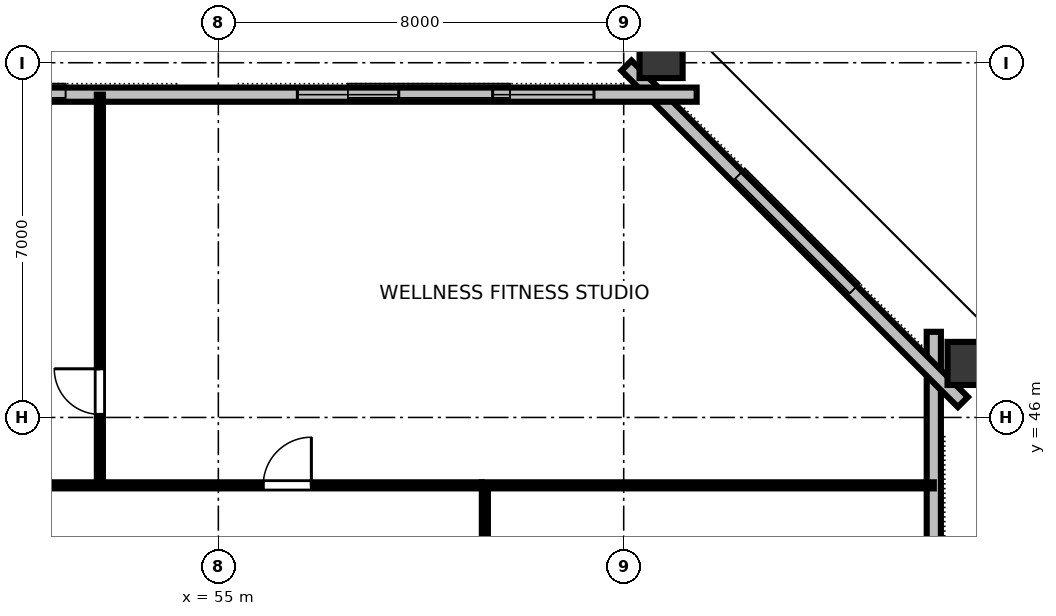
"""IFC4 building model, lengths in metres.
Left out: names, types, materials, properties, quantities, classifications, styles, units other than length and angle.
Written with IfcOpenShell. Run it as: python <this file> out.ifc"""

import sys

from ifc_helpers import new_model, si_unit, direction, frame, frame_2d, origin, origin_2d, place, context, subcontext, project, spatial, rectangle, hollow_rectangle, extrude, element, fill, save


model = new_model("IFC4")
c1 = context("Model", 3, precision=1e-05, world=origin(), true_north=direction((0.0, 1.0)))
c2 = subcontext(c1, "Body", "Model", "MODEL_VIEW")
j1 = project(units=[si_unit("LENGTHUNIT", "METRE"), si_unit("PLANEANGLEUNIT", "RADIAN")], contexts=[c1])
p1 = place(None, origin())
s1 = spatial("IfcSite", under=j1, at=p1, CompositionType="ELEMENT")
p2 = place(p1, origin())
s2 = spatial("IfcBuilding", under=s1, at=p2, CompositionType="ELEMENT")
p3 = place(p2, frame((0.0, 0.0, 152.8)))
s3 = spatial("IfcBuildingStorey", under=s2, at=p3, CompositionType="ELEMENT", Elevation=152.8)
for number, where, z_axis, x_axis in (
    (1, (69.891, 47.066, 0.0), (0.0, 0.0, 1.0), (0.0, 1.0, 0.0)),
    (2, (63.738, 53.198, 0.0), (0.0, 0.0, 1.0), (1.0, 0.0, 0.0)),
):
    element("IfcColumn", number, at=place(p3, frame(where, z_axis=z_axis, x_axis=x_axis)), inside=s3, PredefinedType="COLUMN", context=c2, shape_type="SweptSolid", body=[
        extrude(hollow_rectangle(XDim=0.85, YDim=1.0, WallThickness=0.05, at=origin_2d()), origin(), (0.0, 0.0, 1.0), 3.358),
    ])
p4 = place(p3, frame((69.12, 16.31, 0.0), z_axis=(0.0, 0.0, 1.0), x_axis=(0.0, 1.0, 0.0)))
e3 = element("IfcWall", 3, at=p4, inside=s3, PredefinedType="STANDARD", context=c2, shape_type="SweptSolid", body=[
    extrude(rectangle(XDim=31.38, YDim=0.28, at=frame_2d((15.69, 0.0))), origin(), (0.0, 0.0, 1.0), 3.36),
])
p5 = place(p4, frame((5.571, 0.0, 0.8)))
e4 = element("IfcOpeningElement", 4, at=p5, cuts=e3, PredefinedType="OPENING", context=c2, shape_type="SweptSolid", body=[
    extrude(rectangle(XDim=2.0, YDim=1.95, at=frame_2d((1.0, 0.975))), frame((0.0, 0.15, 0.0), z_axis=(0.0, -1.0, 0.0), x_axis=(1.0, 0.0, 0.0)), (0.0, 0.0, 1.0), 0.3),
])
p6 = place(p4, frame((9.219, 0.0, 0.8)))
e5 = element("IfcOpeningElement", 5, at=p6, cuts=e3, PredefinedType="OPENING", context=c2, shape_type="SweptSolid", body=[
    extrude(rectangle(XDim=2.0, YDim=1.95, at=frame_2d((1.0, 0.975))), frame((0.0, 0.15, 0.0), z_axis=(0.0, -1.0, 0.0), x_axis=(1.0, 0.0, 0.0)), (0.0, 0.0, 1.0), 0.3),
])
p7 = place(p4, frame((20.161, 0.0, 0.8)))
e6 = element("IfcOpeningElement", 6, at=p7, cuts=e3, PredefinedType="OPENING", context=c2, shape_type="SweptSolid", body=[
    extrude(rectangle(XDim=2.0, YDim=1.95, at=frame_2d((1.0, 0.975))), frame((0.0, 0.15, 0.0), z_axis=(0.0, -1.0, 0.0), x_axis=(1.0, 0.0, 0.0)), (0.0, 0.0, 1.0), 0.3),
])
p8 = place(p4, frame((23.809, 0.0, 0.8)))
e7 = element("IfcOpeningElement", 7, at=p8, cuts=e3, PredefinedType="OPENING", context=c2, shape_type="SweptSolid", body=[
    extrude(rectangle(XDim=2.0, YDim=1.95, at=frame_2d((1.0, 0.975))), frame((0.0, 0.15, 0.0), z_axis=(0.0, -1.0, 0.0), x_axis=(1.0, 0.0, 0.0)), (0.0, 0.0, 1.0), 0.3),
])
p9 = place(p3, frame((69.694, 46.304, 0.0), z_axis=(0.0, 0.0, 1.0), x_axis=(-0.707106781187, 0.707106781187, 0.0)))
e8 = element("IfcWall", 8, at=p9, inside=s3, PredefinedType="STANDARD", context=c2, shape_type="SweptSolid", body=[
    extrude(rectangle(XDim=9.39, YDim=0.28, at=frame_2d((4.695, 0.0))), origin(), (0.0, 0.0, 1.0), 3.36),
])
p10 = place(p3, frame((64.44, 52.37, 0.0), z_axis=(0.0, 0.0, 1.0), x_axis=(-1.0, 0.0, 0.0)))
e9 = element("IfcWall", 9, at=p10, inside=s3, PredefinedType="STANDARD", context=c2, shape_type="SweptSolid", body=[
    extrude(rectangle(XDim=36.88, YDim=0.28, at=frame_2d((18.44, 0.0))), origin(), (0.0, 0.0, 1.0), 3.36),
])
p11 = place(p10, frame((2.027, 0.0, 0.8)))
e10 = element("IfcOpeningElement", 10, at=p11, cuts=e9, PredefinedType="OPENING", context=c2, shape_type="SweptSolid", body=[
    extrude(rectangle(XDim=2.0, YDim=1.95, at=frame_2d((1.0, 0.975))), frame((0.0, 0.15, 0.0), z_axis=(0.0, -1.0, 0.0), x_axis=(1.0, 0.0, 0.0)), (0.0, 0.0, 1.0), 0.3),
])
p12 = place(p10, frame((5.88, 0.0, 0.8)))
e11 = element("IfcOpeningElement", 11, at=p12, cuts=e9, PredefinedType="OPENING", context=c2, shape_type="SweptSolid", body=[
    extrude(rectangle(XDim=2.0, YDim=1.95, at=frame_2d((1.0, 0.975))), frame((0.0, 0.15, 0.0), z_axis=(0.0, -1.0, 0.0), x_axis=(1.0, 0.0, 0.0)), (0.0, 0.0, 1.0), 0.3),
])
p13 = place(p10, frame((13.587, 0.0, 0.8)))
e12 = element("IfcOpeningElement", 12, at=p13, cuts=e9, PredefinedType="OPENING", context=c2, shape_type="SweptSolid", body=[
    extrude(rectangle(XDim=2.0, YDim=1.95, at=frame_2d((1.0, 0.975))), frame((0.0, 0.15, 0.0), z_axis=(0.0, -1.0, 0.0), x_axis=(1.0, 0.0, 0.0)), (0.0, 0.0, 1.0), 0.3),
])
p14 = place(p10, frame((21.293, 0.0, 0.8)))
e13 = element("IfcOpeningElement", 13, at=p14, cuts=e9, PredefinedType="OPENING", context=c2, shape_type="SweptSolid", body=[
    extrude(rectangle(XDim=2.0, YDim=1.95, at=frame_2d((1.0, 0.975))), frame((0.0, 0.15, 0.0), z_axis=(0.0, -1.0, 0.0), x_axis=(1.0, 0.0, 0.0)), (0.0, 0.0, 1.0), 0.3),
])
p15 = place(p10, frame((25.147, 0.0, 0.8)))
e14 = element("IfcOpeningElement", 14, at=p15, cuts=e9, PredefinedType="OPENING", context=c2, shape_type="SweptSolid", body=[
    extrude(rectangle(XDim=2.0, YDim=1.95, at=frame_2d((1.0, 0.975))), frame((0.0, 0.15, 0.0), z_axis=(0.0, -1.0, 0.0), x_axis=(1.0, 0.0, 0.0)), (0.0, 0.0, 1.0), 0.3),
])
p16 = place(p10, frame((29.0, 0.0, 0.8)))
e15 = element("IfcOpeningElement", 15, at=p16, cuts=e9, PredefinedType="OPENING", context=c2, shape_type="SweptSolid", body=[
    extrude(rectangle(XDim=2.0, YDim=1.95, at=frame_2d((1.0, 0.975))), frame((0.0, 0.15, 0.0), z_axis=(0.0, -1.0, 0.0), x_axis=(1.0, 0.0, 0.0)), (0.0, 0.0, 1.0), 0.3),
])
p17 = place(p10, frame((32.853, 0.0, 0.8)))
e16 = element("IfcOpeningElement", 16, at=p17, cuts=e9, PredefinedType="OPENING", context=c2, shape_type="SweptSolid", body=[
    extrude(rectangle(XDim=2.0, YDim=1.95, at=frame_2d((1.0, 0.975))), frame((0.0, 0.15, 0.0), z_axis=(0.0, -1.0, 0.0), x_axis=(1.0, 0.0, 0.0)), (0.0, 0.0, 1.0), 0.3),
])
p18 = place(p3, frame((52.662, 44.66, 0.0), z_axis=(0.0, 0.0, 1.0), x_axis=(0.0, 1.0, 0.0)))
e17 = element("IfcWall", 17, at=p18, inside=s3, PredefinedType="PARTITIONING", context=c2, shape_type="SweptSolid", body=[
    extrude(rectangle(XDim=7.71, YDim=0.12, at=frame_2d((3.855, 0.0))), origin(), (0.0, 0.0, 1.0), 2.64),
])
p19 = place(p18, frame((1.4, 0.0, 0.0)))
e18 = element("IfcOpeningElement", 18, at=p19, cuts=e17, PredefinedType="OPENING", context=c2, shape_type="SweptSolid", body=[
    extrude(rectangle(XDim=0.9, YDim=2.15, at=frame_2d((0.45, 1.075))), frame((0.0, 0.07, 0.0), z_axis=(0.0, -1.0, 0.0), x_axis=(1.0, 0.0, 0.0)), (0.0, 0.0, 1.0), 0.14),
])
p20 = place(p3, frame((31.8, 44.66, 0.0), z_axis=(0.0, 0.0, 1.0), x_axis=(1.0, 0.0, 0.0)))
e19 = element("IfcWall", 19, at=p20, inside=s3, PredefinedType="PARTITIONING", context=c2, shape_type="SweptSolid", body=[
    extrude(rectangle(XDim=28.4, YDim=0.12, at=frame_2d((14.2, 0.0))), origin(), (0.0, 0.0, 1.0), 2.64),
])
p21 = place(p20, frame((4.036, 0.0, 0.0)))
e20 = element("IfcOpeningElement", 20, at=p21, cuts=e19, PredefinedType="OPENING", context=c2, shape_type="SweptSolid", body=[
    extrude(rectangle(XDim=0.95, YDim=2.15, at=frame_2d((0.475, 1.075))), frame((0.0, 0.07, 0.0), z_axis=(0.0, -1.0, 0.0), x_axis=(1.0, 0.0, 0.0)), (0.0, 0.0, 1.0), 0.14),
])
p22 = place(p20, frame((12.256, 0.0, 0.0)))
e21 = element("IfcOpeningElement", 21, at=p22, cuts=e19, PredefinedType="OPENING", context=c2, shape_type="SweptSolid", body=[
    extrude(rectangle(XDim=0.95, YDim=2.15, at=frame_2d((0.475, 1.075))), frame((0.0, 0.07, 0.0), z_axis=(0.0, -1.0, 0.0), x_axis=(1.0, 0.0, 0.0)), (0.0, 0.0, 1.0), 0.14),
])
p23 = place(p20, frame((18.246, 0.0, 0.0)))
e22 = element("IfcOpeningElement", 22, at=p23, cuts=e19, PredefinedType="OPENING", context=c2, shape_type="SweptSolid", body=[
    extrude(rectangle(XDim=0.95, YDim=2.15, at=frame_2d((0.475, 1.075))), frame((0.0, 0.07, 0.0), z_axis=(0.0, -1.0, 0.0), x_axis=(1.0, 0.0, 0.0)), (0.0, 0.0, 1.0), 0.14),
])
p24 = place(p20, frame((24.086, 0.0, 0.0)))
e23 = element("IfcOpeningElement", 23, at=p24, cuts=e19, PredefinedType="OPENING", context=c2, shape_type="SweptSolid", body=[
    extrude(rectangle(XDim=0.95, YDim=2.15, at=frame_2d((0.475, 1.075))), frame((0.0, 0.07, 0.0), z_axis=(0.0, -1.0, 0.0), x_axis=(1.0, 0.0, 0.0)), (0.0, 0.0, 1.0), 0.14),
])
p25 = place(p3, frame((60.26, 33.02, 0.0), z_axis=(0.0, 0.0, 1.0), x_axis=(0.0, 1.0, 0.0)))
e24 = element("IfcWall", 24, at=p25, inside=s3, PredefinedType="PARTITIONING", context=c2, shape_type="SweptSolid", body=[
    extrude(rectangle(XDim=11.58, YDim=0.12, at=frame_2d((5.79, 0.0))), origin(), (0.0, 0.0, 1.0), 2.64),
])
p26 = place(p25, frame((5.215, 0.0, 0.0)))
e25 = element("IfcOpeningElement", 25, at=p26, cuts=e24, PredefinedType="OPENING", context=c2, shape_type="SweptSolid", body=[
    extrude(rectangle(XDim=0.95, YDim=2.15, at=frame_2d((0.475, 1.075))), frame((0.0, 0.07, 0.0), z_axis=(0.0, -1.0, 0.0), x_axis=(1.0, 0.0, 0.0)), (0.0, 0.0, 1.0), 0.14),
])
p27 = place(p3, frame((60.2, 44.66, 0.0), z_axis=(0.0, 0.0, 1.0), x_axis=(1.0, 0.0, 0.0)))
e26 = element("IfcWall", 26, at=p27, inside=s3, PredefinedType="PARTITIONING", context=c2, shape_type="SweptSolid", body=[
    extrude(rectangle(XDim=8.92, YDim=0.12, at=frame_2d((4.46, 0.0))), origin(), (0.0, 0.0, 1.0), 2.64),
])
p28 = place(p11, origin())
e27 = element("IfcWindow", 27, at=p28, inside=s3, PartitioningType="SINGLE_PANEL", PredefinedType="WINDOW", context=c2, shape_type="SweptSolid", body=[
    extrude(rectangle(XDim=2.0, YDim=1.95, at=frame_2d((1.0, 0.975))), frame((0.0, 0.03, 0.0), z_axis=(0.0, -1.0, 0.0), x_axis=(1.0, 0.0, 0.0)), (0.0, 0.0, 1.0), 0.06),
])
fill(e10, e27)
p29 = place(p12, origin())
e28 = element("IfcWindow", 28, at=p29, inside=s3, PartitioningType="SINGLE_PANEL", PredefinedType="WINDOW", context=c2, shape_type="SweptSolid", body=[
    extrude(rectangle(XDim=2.0, YDim=1.95, at=frame_2d((1.0, 0.975))), frame((0.0, 0.03, 0.0), z_axis=(0.0, -1.0, 0.0), x_axis=(1.0, 0.0, 0.0)), (0.0, 0.0, 1.0), 0.06),
])
fill(e11, e28)
p30 = place(p19, origin())
e29 = element("IfcDoor", 29, at=p30, inside=s3, OperationType="SINGLE_SWING_RIGHT", PredefinedType="DOOR", context=c2, shape_type="SweptSolid", body=[
    extrude(rectangle(XDim=0.9, YDim=2.15, at=frame_2d((0.45, 1.075))), frame((0.0, 0.025, 0.0), z_axis=(0.0, -1.0, 0.0), x_axis=(1.0, 0.0, 0.0)), (0.0, 0.0, 1.0), 0.05),
])
fill(e18, e29)
p31 = place(p24, origin())
e30 = element("IfcDoor", 30, at=p31, inside=s3, OperationType="SINGLE_SWING_RIGHT", PredefinedType="DOOR", context=c2, shape_type="SweptSolid", body=[
    extrude(rectangle(XDim=0.95, YDim=2.15, at=frame_2d((0.475, 1.075))), frame((0.0, 0.025, 0.0), z_axis=(0.0, -1.0, 0.0), x_axis=(1.0, 0.0, 0.0)), (0.0, 0.0, 1.0), 0.05),
])
fill(e23, e30)
save(model, sys.argv[1])
